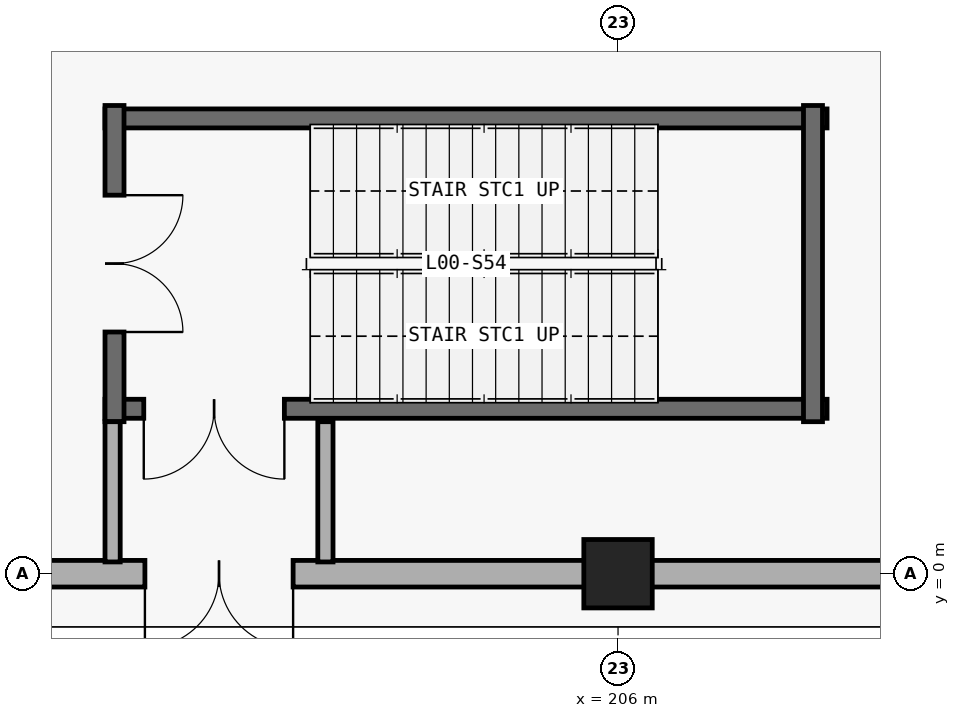
"""IFC4 building model, lengths in metres.
Left out: names, types, materials, properties, quantities, classifications, styles, units other than length and angle.
Written with IfcOpenShell. Run it as: python <this file> out.ifc"""

import sys

from ifc_helpers import new_model, si_unit, direction, frame, frame_2d, origin, origin_2d, place, context, subcontext, project, spatial, rectangle, extrude, element, fill, save


model = new_model("IFC4")
c1 = context("Model", 3, precision=1e-05, world=origin(), true_north=direction((0.0, 1.0)))
c2 = subcontext(c1, "Body", "Model", "MODEL_VIEW")
j1 = project(units=[si_unit("LENGTHUNIT", "METRE"), si_unit("PLANEANGLEUNIT", "RADIAN")], contexts=[c1])
p1 = place(None, origin())
s1 = spatial("IfcSite", under=j1, at=p1, CompositionType="ELEMENT")
p2 = place(p1, origin())
s2 = spatial("IfcBuilding", under=s1, at=p2, CompositionType="ELEMENT")
p3 = place(p2, origin())
s3 = spatial("IfcBuildingStorey", under=s2, at=p3, CompositionType="ELEMENT", Elevation=0.0)
p4 = place(p3, frame((206.0, 0.0, 0.0), z_axis=(0.0, 0.0, 1.0), x_axis=(1.0, 0.0, 0.0)))
e1 = element("IfcColumn", 1, at=p4, inside=s3, PredefinedType="COLUMN", context=c2, shape_type="SweptSolid", body=[
    extrude(rectangle(XDim=0.9, YDim=0.9, at=origin_2d()), origin(), (0.0, 0.0, 1.0), 5.4),
])
p5 = place(p3, frame((214.575, 0.0, 0.0), z_axis=(0.0, 0.0, 1.0), x_axis=(-1.0, 0.0, 0.0)))
e2 = element("IfcWall", 2, at=p5, inside=s3, PredefinedType="STANDARD", context=c2, shape_type="SweptSolid", body=[
    extrude(rectangle(XDim=8.15, YDim=0.35, at=frame_2d((4.075, 0.0))), origin(), (0.0, 0.0, 1.0), 4.384),
])
p6 = place(p5, frame((2.002, 0.0, 0.95)))
e3 = element("IfcOpeningElement", 3, at=p6, cuts=e2, PredefinedType="OPENING", context=c2, shape_type="SweptSolid", body=[
    extrude(rectangle(XDim=1.7, YDim=1.75, at=frame_2d((0.85, 0.875))), frame((0.0, 0.185, 0.0), z_axis=(0.0, -1.0, 0.0), x_axis=(1.0, 0.0, 0.0)), (0.0, 0.0, 1.0), 0.37),
])
p7 = place(p3, frame((205.575, 0.0, 0.0), z_axis=(0.0, 0.0, 1.0), x_axis=(-1.0, 0.0, 0.0)))
e4 = element("IfcWall", 4, at=p7, inside=s3, PredefinedType="STANDARD", context=c2, shape_type="SweptSolid", body=[
    extrude(rectangle(XDim=8.15, YDim=0.35, at=frame_2d((4.075, 0.0))), origin(), (0.0, 0.0, 1.0), 4.384),
])
p8 = place(p7, frame((3.85, 0.0, 0.0)))
e5 = element("IfcOpeningElement", 5, at=p8, cuts=e4, PredefinedType="OPENING", context=c2, shape_type="SweptSolid", body=[
    extrude(rectangle(XDim=1.95, YDim=2.25, at=frame_2d((0.975, 1.125))), frame((0.0, 0.185, 0.0), z_axis=(0.0, -1.0, 0.0), x_axis=(1.0, 0.0, 0.0)), (0.0, 0.0, 1.0), 0.37),
])
p9 = place(p3, frame((208.75, 2.17, 0.0), z_axis=(0.0, 0.0, 1.0), x_axis=(-1.0, 0.0, 0.0)))
e6 = element("IfcWall", 6, at=p9, inside=s3, PredefinedType="SHEAR", context=c2, shape_type="SweptSolid", body=[
    extrude(rectangle(XDim=9.5, YDim=0.25, at=frame_2d((4.75, 0.0))), origin(), (0.0, 0.0, 1.0), 5.1),
])
p10 = place(p9, frame((7.14, 0.0, 0.0)))
e7 = element("IfcOpeningElement", 7, at=p10, cuts=e6, PredefinedType="OPENING", context=c2, shape_type="SweptSolid", body=[
    extrude(rectangle(XDim=1.85, YDim=2.3, at=frame_2d((0.925, 1.15))), frame((0.0, 0.135, 0.0), z_axis=(0.0, -1.0, 0.0), x_axis=(1.0, 0.0, 0.0)), (0.0, 0.0, 1.0), 0.27),
])
p11 = place(p3, frame((208.75, 5.99, 0.0), z_axis=(0.0, 0.0, 1.0), x_axis=(-1.0, 0.0, 0.0)))
e8 = element("IfcWall", 8, at=p11, inside=s3, PredefinedType="SHEAR", context=c2, shape_type="SweptSolid", body=[
    extrude(rectangle(XDim=9.5, YDim=0.25, at=frame_2d((4.75, 0.0))), origin(), (0.0, 0.0, 1.0), 5.1),
])
p12 = place(p3, frame((199.375, 6.16, 0.0), z_axis=(0.0, 0.0, 1.0), x_axis=(0.0, -1.0, 0.0)))
e9 = element("IfcWall", 9, at=p12, inside=s3, PredefinedType="SHEAR", context=c2, shape_type="SweptSolid", body=[
    extrude(rectangle(XDim=4.16, YDim=0.25, at=frame_2d((2.08, 0.0))), origin(), (0.0, 0.0, 1.0), 5.1),
])
p13 = place(p12, frame((1.18, 0.0, 0.0)))
e10 = element("IfcOpeningElement", 10, at=p13, cuts=e9, PredefinedType="OPENING", context=c2, shape_type="SweptSolid", body=[
    extrude(rectangle(XDim=1.8, YDim=2.25, at=frame_2d((0.9, 1.125))), frame((0.0, 0.135, 0.0), z_axis=(0.0, -1.0, 0.0), x_axis=(1.0, 0.0, 0.0)), (0.0, 0.0, 1.0), 0.27),
])
p14 = place(p3, frame((208.565, 2.0, 0.0), z_axis=(0.0, 0.0, 1.0), x_axis=(0.0, 1.0, 0.0)))
e11 = element("IfcWall", 11, at=p14, inside=s3, PredefinedType="SHEAR", context=c2, shape_type="SweptSolid", body=[
    extrude(rectangle(XDim=4.16, YDim=0.25, at=frame_2d((2.08, 0.0))), origin(), (0.0, 0.0, 1.0), 5.1),
])
for number, where, z_axis, x_axis in (
    (12, (199.35, 2.0, 0.0), (0.0, 0.0, 1.0), (0.0, -1.0, 0.0)),
    (13, (202.15, 2.0, 0.0), (0.0, 0.0, 1.0), (0.0, -1.0, 0.0)),
):
    element("IfcWall", number, at=place(p3, frame(where, z_axis=z_axis, x_axis=x_axis)), inside=s3, PredefinedType="PARTITIONING", context=c2, shape_type="SweptSolid", body=[
        extrude(rectangle(XDim=1.845, YDim=0.2, at=frame_2d((0.922, 0.0))), origin(), (0.0, 0.0, 1.0), 4.384),
    ])
p15 = place(p8, origin())
e14 = element("IfcDoor", 14, at=p15, inside=s3, OperationType="DOUBLE_DOOR_SINGLE_SWING", PredefinedType="DOOR", context=c2, shape_type="SweptSolid", body=[
    extrude(rectangle(XDim=1.95, YDim=2.25, at=frame_2d((0.975, 1.125))), frame((0.0, 0.025, 0.0), z_axis=(0.0, -1.0, 0.0), x_axis=(1.0, 0.0, 0.0)), (0.0, 0.0, 1.0), 0.05),
])
fill(e5, e14)
p16 = place(p13, origin())
e15 = element("IfcDoor", 15, at=p16, inside=s3, OperationType="DOUBLE_DOOR_SINGLE_SWING", PredefinedType="DOOR", context=c2, shape_type="SweptSolid", body=[
    extrude(rectangle(XDim=1.8, YDim=2.25, at=frame_2d((0.9, 1.125))), frame((0.0, 0.025, 0.0), z_axis=(0.0, -1.0, 0.0), x_axis=(1.0, 0.0, 0.0)), (0.0, 0.0, 1.0), 0.05),
])
fill(e10, e15)
p17 = place(p10, origin())
e16 = element("IfcDoor", 16, at=p17, inside=s3, OperationType="DOUBLE_DOOR_SINGLE_SWING", PredefinedType="DOOR", context=c2, shape_type="SweptSolid", body=[
    extrude(rectangle(XDim=1.85, YDim=2.3, at=frame_2d((0.925, 1.15))), frame((0.0, 0.025, 0.0), z_axis=(0.0, -1.0, 0.0), x_axis=(1.0, 0.0, 0.0)), (0.0, 0.0, 1.0), 0.05),
])
fill(e7, e16)
save(model, sys.argv[1])
